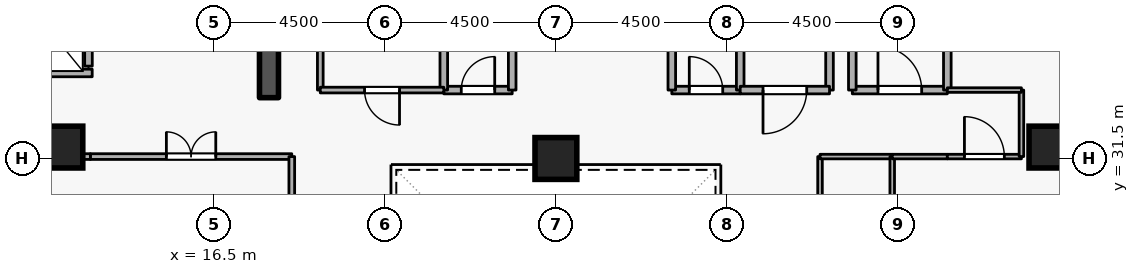
"""IFC4 building model, lengths in metres.
Left out: names, types, materials, properties, quantities, classifications, styles, units other than length and angle.
Written with IfcOpenShell. Run it as: python <this file> out.ifc"""

import sys

from ifc_helpers import new_model, si_unit, direction, frame, frame_2d, origin, origin_2d, place, context, subcontext, project, spatial, rectangle, extrude, element, fill, save


model = new_model("IFC4")
c1 = context("Model", 3, precision=1e-05, world=origin(), true_north=direction((0.0, 1.0)))
c2 = subcontext(c1, "Body", "Model", "MODEL_VIEW")
j1 = project(units=[si_unit("LENGTHUNIT", "METRE"), si_unit("PLANEANGLEUNIT", "RADIAN")], contexts=[c1])
p1 = place(None, origin())
s1 = spatial("IfcSite", under=j1, at=p1, CompositionType="ELEMENT")
p2 = place(p1, origin())
s2 = spatial("IfcBuilding", under=s1, at=p2, CompositionType="ELEMENT")
p3 = place(p2, frame((0.0, 0.0, 167.1)))
s3 = spatial("IfcBuildingStorey", under=s2, at=p3, CompositionType="ELEMENT", Elevation=167.1)
p4 = place(p3, frame((17.95, 33.1, 0.0), z_axis=(0.0, 0.0, 1.0), x_axis=(0.0, 1.0, 0.0)))
e1 = element("IfcWall", 1, at=p4, inside=s3, PredefinedType="SHEAR", context=c2, shape_type="SweptSolid", body=[
    extrude(rectangle(XDim=5.8, YDim=0.5, at=frame_2d((2.9, 0.0))), origin(), (0.0, 0.0, 1.0), 3.6),
])
for number, where, z_axis, x_axis in (
    (2, (12.5, 31.8, 0.0), (0.0, 0.0, 1.0), (1.0, 0.0, 0.0)),
    (3, (38.5, 31.8, 0.0), (0.0, 0.0, 1.0), (1.0, 0.0, 0.0)),
    (4, (25.5, 31.5, 0.0), (0.0, 0.0, 1.0), (1.0, 0.0, 0.0)),
):
    element("IfcColumn", number, at=place(p3, frame(where, z_axis=z_axis, x_axis=x_axis)), inside=s3, PredefinedType="COLUMN", context=c2, shape_type="SweptSolid", body=[
        extrude(rectangle(XDim=1.1, YDim=1.1, at=origin_2d()), origin(), (0.0, 0.0, 1.0), 3.6),
    ])
p5 = place(p3, frame((13.2, 33.93, 0.0), z_axis=(0.0, 0.0, 1.0), x_axis=(0.0, 1.0, 0.0)))
e5 = element("IfcWall", 5, at=p5, inside=s3, PredefinedType="STANDARD", context=c2, shape_type="SweptSolid", body=[
    extrude(rectangle(XDim=1.94, YDim=0.2, at=frame_2d((0.97, 0.0))), origin(), (0.0, 0.0, 1.0), 3.34),
])
p6 = place(p5, frame((0.46, 0.0, 0.0)))
e6 = element("IfcOpeningElement", 6, at=p6, cuts=e5, PredefinedType="OPENING", context=c2, shape_type="SweptSolid", body=[
    extrude(rectangle(XDim=1.02, YDim=2.06, at=frame_2d((0.51, 1.03))), frame((0.0, 0.11, 0.0), z_axis=(0.0, -1.0, 0.0), x_axis=(1.0, 0.0, 0.0)), (0.0, 0.0, 1.0), 0.22),
])
p7 = place(p3, frame((11.002, 33.75, 0.0), z_axis=(0.0, 0.0, 1.0), x_axis=(1.0, 0.0, 0.0)))
e7 = element("IfcWall", 7, at=p7, inside=s3, PredefinedType="STANDARD", context=c2, shape_type="SweptSolid", body=[
    extrude(rectangle(XDim=2.296, YDim=0.2, at=frame_2d((1.148, 0.0))), origin(), (0.0, 0.0, 1.0), 3.34),
])
p8 = place(p3, frame((33.3, 33.3, 0.0), z_axis=(0.0, 0.0, 1.0), x_axis=(1.0, 0.0, 0.0)))
e8 = element("IfcWall", 8, at=p8, inside=s3, PredefinedType="STANDARD", context=c2, shape_type="SweptSolid", body=[
    extrude(rectangle(XDim=2.5, YDim=0.2, at=frame_2d((1.25, 0.0))), origin(), (0.0, 0.0, 1.0), 3.34),
])
p9 = place(p8, frame((0.675, 0.0, 0.0)))
e9 = element("IfcOpeningElement", 9, at=p9, cuts=e8, PredefinedType="OPENING", context=c2, shape_type="SweptSolid", body=[
    extrude(rectangle(XDim=1.15, YDim=2.1, at=frame_2d((0.575, 1.05))), frame((0.0, 0.11, 0.0), z_axis=(0.0, -1.0, 0.0), x_axis=(1.0, 0.0, 0.0)), (0.0, 0.0, 1.0), 0.22),
])
p10 = place(p3, frame((35.8, 33.3, 0.0), z_axis=(0.0, 0.0, 1.0), x_axis=(0.0, 1.0, 0.0)))
e10 = element("IfcWall", 10, at=p10, inside=s3, PredefinedType="STANDARD", context=c2, shape_type="SweptSolid", body=[
    extrude(rectangle(XDim=5.7, YDim=0.2, at=frame_2d((2.85, 0.0))), origin(), (0.0, 0.0, 1.0), 3.34),
])
p11 = place(p3, frame((33.3, 35.6, 0.0), z_axis=(0.0, 0.0, 1.0), x_axis=(0.0, -1.0, 0.0)))
e11 = element("IfcWall", 11, at=p11, inside=s3, PredefinedType="STANDARD", context=c2, shape_type="SweptSolid", body=[
    extrude(rectangle(XDim=2.3, YDim=0.2, at=frame_2d((1.15, 0.0))), origin(), (0.0, 0.0, 1.0), 2.545),
])
p12 = place(p3, frame((22.55, 33.3, 0.0), z_axis=(0.0, 0.0, 1.0), x_axis=(1.0, 0.0, 0.0)))
e12 = element("IfcWall", 12, at=p12, inside=s3, PredefinedType="STANDARD", context=c2, shape_type="SweptSolid", body=[
    extrude(rectangle(XDim=1.8, YDim=0.2, at=frame_2d((0.9, 0.0))), origin(), (0.0, 0.0, 1.0), 3.34),
])
p13 = place(p12, frame((0.46, 0.0, 0.0)))
e13 = element("IfcOpeningElement", 13, at=p13, cuts=e12, PredefinedType="OPENING", context=c2, shape_type="SweptSolid", body=[
    extrude(rectangle(XDim=0.88, YDim=2.04, at=frame_2d((0.44, 1.02))), frame((0.0, 0.11, 0.0), z_axis=(0.0, -1.0, 0.0), x_axis=(1.0, 0.0, 0.0)), (0.0, 0.0, 1.0), 0.22),
])
for number, where, z_axis, x_axis in (
    (14, (24.35, 33.3, 0.0), (0.0, 0.0, 1.0), (0.0, 1.0, 0.0)),
    (15, (22.55, 35.35, 0.0), (0.0, 0.0, 1.0), (0.0, -1.0, 0.0)),
):
    element("IfcWall", number, at=place(p3, frame(where, z_axis=z_axis, x_axis=x_axis)), inside=s3, PredefinedType="STANDARD", context=c2, shape_type="SweptSolid", body=[
        extrude(rectangle(XDim=2.05, YDim=0.2, at=frame_2d((1.025, 0.0))), origin(), (0.0, 0.0, 1.0), 3.34),
    ])
p14 = place(p3, frame((28.55, 33.3, 0.0), z_axis=(0.0, 0.0, 1.0), x_axis=(1.0, 0.0, 0.0)))
e16 = element("IfcWall", 16, at=p14, inside=s3, PredefinedType="STANDARD", context=c2, shape_type="SweptSolid", body=[
    extrude(rectangle(XDim=1.8, YDim=0.2, at=frame_2d((0.9, 0.0))), origin(), (0.0, 0.0, 1.0), 3.34),
])
p15 = place(p14, frame((0.46, 0.0, 0.0)))
e17 = element("IfcOpeningElement", 17, at=p15, cuts=e16, PredefinedType="OPENING", context=c2, shape_type="SweptSolid", body=[
    extrude(rectangle(XDim=0.88, YDim=2.04, at=frame_2d((0.44, 1.02))), frame((0.0, 0.11, 0.0), z_axis=(0.0, -1.0, 0.0), x_axis=(1.0, 0.0, 0.0)), (0.0, 0.0, 1.0), 0.22),
])
for number, where, z_axis, x_axis in (
    (18, (30.35, 33.3, 0.0), (0.0, 0.0, 1.0), (0.0, 1.0, 0.0)),
    (19, (28.55, 35.35, 0.0), (0.0, 0.0, 1.0), (0.0, -1.0, 0.0)),
):
    element("IfcWall", number, at=place(p3, frame(where, z_axis=z_axis, x_axis=x_axis)), inside=s3, PredefinedType="STANDARD", context=c2, shape_type="SweptSolid", body=[
        extrude(rectangle(XDim=2.05, YDim=0.2, at=frame_2d((1.025, 0.0))), origin(), (0.0, 0.0, 1.0), 3.34),
    ])
p16 = place(p3, frame((32.7, 35.35, 0.0), z_axis=(0.0, 0.0, 1.0), x_axis=(0.0, -1.0, 0.0)))
e20 = element("IfcWall", 20, at=p16, inside=s3, PredefinedType="STANDARD", context=c2, shape_type="SweptSolid", body=[
    extrude(rectangle(XDim=2.05, YDim=0.2, at=frame_2d((1.025, 0.0))), origin(), (0.0, 0.0, 1.0), 2.545),
])
p17 = place(p3, frame((32.7, 33.3, 0.0), z_axis=(0.0, 0.0, 1.0), x_axis=(-1.0, 0.0, 0.0)))
e21 = element("IfcWall", 21, at=p17, inside=s3, PredefinedType="STANDARD", context=c2, shape_type="SweptSolid", body=[
    extrude(rectangle(XDim=2.35, YDim=0.2, at=frame_2d((1.175, 0.0))), origin(), (0.0, 0.0, 1.0), 3.34),
])
p18 = place(p17, frame((0.6, 0.0, 0.0)))
e22 = element("IfcOpeningElement", 22, at=p18, cuts=e21, PredefinedType="OPENING", context=c2, shape_type="SweptSolid", body=[
    extrude(rectangle(XDim=1.15, YDim=2.1, at=frame_2d((0.575, 1.05))), frame((0.0, 0.11, 0.0), z_axis=(0.0, -1.0, 0.0), x_axis=(1.0, 0.0, 0.0)), (0.0, 0.0, 1.0), 0.22),
])
p19 = place(p3, frame((19.3, 33.3, 0.0), z_axis=(0.0, 0.0, 1.0), x_axis=(0.0, 1.0, 0.0)))
e23 = element("IfcWall", 23, at=p19, inside=s3, PredefinedType="PARTITIONING", context=c2, shape_type="SweptSolid", body=[
    extrude(rectangle(XDim=2.05, YDim=0.15, at=frame_2d((1.025, 0.0))), origin(), (0.0, 0.0, 1.0), 3.34),
])
p20 = place(p3, frame((22.55, 33.3, 0.0), z_axis=(0.0, 0.0, 1.0), x_axis=(-1.0, 0.0, 0.0)))
e24 = element("IfcWall", 24, at=p20, inside=s3, PredefinedType="PARTITIONING", context=c2, shape_type="SweptSolid", body=[
    extrude(rectangle(XDim=3.25, YDim=0.15, at=frame_2d((1.625, 0.0))), origin(), (0.0, 0.0, 1.0), 3.34),
])
p21 = place(p20, frame((1.165, 0.0, 0.0)))
e25 = element("IfcOpeningElement", 25, at=p21, cuts=e24, PredefinedType="OPENING", context=c2, shape_type="SweptSolid", body=[
    extrude(rectangle(XDim=0.92, YDim=2.08, at=frame_2d((0.46, 1.04))), frame((0.0, 0.085, 0.0), z_axis=(0.0, -1.0, 0.0), x_axis=(1.0, 0.0, 0.0)), (0.0, 0.0, 1.0), 0.17),
])
p22 = place(p3, frame((13.25, 31.55, 0.0), z_axis=(0.0, 0.0, 1.0), x_axis=(1.0, 0.0, 0.0)))
e26 = element("IfcWall", 26, at=p22, inside=s3, PredefinedType="PARTITIONING", context=c2, shape_type="SweptSolid", body=[
    extrude(rectangle(XDim=5.3, YDim=0.15, at=frame_2d((2.65, 0.0))), origin(), (0.0, 0.0, 1.0), 3.34),
])
p23 = place(p22, frame((2.0, 0.0, 0.0)))
e27 = element("IfcOpeningElement", 27, at=p23, cuts=e26, PredefinedType="OPENING", context=c2, shape_type="SweptSolid", body=[
    extrude(rectangle(XDim=1.3, YDim=2.12, at=frame_2d((0.65, 1.06))), frame((0.0, 0.085, 0.0), z_axis=(0.0, -1.0, 0.0), x_axis=(1.0, 0.0, 0.0)), (0.0, 0.0, 1.0), 0.17),
])
p24 = place(p3, frame((18.55, 31.55, 0.0), z_axis=(0.0, 0.0, 1.0), x_axis=(0.0, -1.0, 0.0)))
e28 = element("IfcWall", 28, at=p24, inside=s3, PredefinedType="PARTITIONING", context=c2, shape_type="SweptSolid", body=[
    extrude(rectangle(XDim=2.25, YDim=0.15, at=frame_2d((1.125, 0.0))), origin(), (0.0, 0.0, 1.0), 3.34),
])
p25 = place(p3, frame((10.9, 31.55, 0.0), z_axis=(0.0, 0.0, 1.0), x_axis=(1.0, 0.0, 0.0)))
e29 = element("IfcWall", 29, at=p25, inside=s3, PredefinedType="PARTITIONING", context=c2, shape_type="SweptSolid", body=[
    extrude(rectangle(XDim=2.35, YDim=0.15, at=frame_2d((1.175, 0.0))), origin(), (0.0, 0.0, 1.0), 3.34),
])
p26 = place(p3, frame((32.45, 27.0, 0.0), z_axis=(0.0, 0.0, 1.0), x_axis=(0.0, 1.0, 0.0)))
e30 = element("IfcWall", 30, at=p26, inside=s3, PredefinedType="PARTITIONING", context=c2, shape_type="SweptSolid", body=[
    extrude(rectangle(XDim=4.55, YDim=0.12, at=frame_2d((2.275, 0.0))), origin(), (0.0, 0.0, 1.0), 3.34),
])
p27 = place(p26, frame((1.8, 0.0, 0.0)))
e31 = element("IfcOpeningElement", 31, at=p27, cuts=e30, PredefinedType="OPENING", context=c2, shape_type="SweptSolid", body=[
    extrude(rectangle(XDim=0.95, YDim=2.1, at=frame_2d((0.475, 1.05))), frame((0.0, 0.07, 0.0), z_axis=(0.0, -1.0, 0.0), x_axis=(1.0, 0.0, 0.0)), (0.0, 0.0, 1.0), 0.14),
])
p28 = place(p3, frame((32.45, 31.55, 0.0), z_axis=(0.0, 0.0, 1.0), x_axis=(1.0, 0.0, 0.0)))
e32 = element("IfcWall", 32, at=p28, inside=s3, PredefinedType="PARTITIONING", context=c2, shape_type="SweptSolid", body=[
    extrude(rectangle(XDim=1.9, YDim=0.12, at=frame_2d((0.95, 0.0))), origin(), (0.0, 0.0, 1.0), 3.34),
])
p29 = place(p3, frame((34.35, 31.55, 0.0), z_axis=(0.0, 0.0, 1.0), x_axis=(0.0, -1.0, 0.0)))
e33 = element("IfcWall", 33, at=p29, inside=s3, PredefinedType="PARTITIONING", context=c2, shape_type="SweptSolid", body=[
    extrude(rectangle(XDim=4.55, YDim=0.12, at=frame_2d((2.275, 0.0))), origin(), (0.0, 0.0, 1.0), 3.34),
])
p30 = place(p3, frame((34.35, 31.55, 0.0), z_axis=(0.0, 0.0, 1.0), x_axis=(1.0, 0.0, 0.0)))
e34 = element("IfcWall", 34, at=p30, inside=s3, PredefinedType="PARTITIONING", context=c2, shape_type="SweptSolid", body=[
    extrude(rectangle(XDim=1.45, YDim=0.12, at=frame_2d((0.725, 0.0))), origin(), (0.0, 0.0, 1.0), 3.34),
])
p31 = place(p3, frame((35.8, 31.55, 0.0), z_axis=(0.0, 0.0, 1.0), x_axis=(1.0, 0.0, 0.0)))
e35 = element("IfcWall", 35, at=p31, inside=s3, PredefinedType="PARTITIONING", context=c2, shape_type="SweptSolid", body=[
    extrude(rectangle(XDim=1.95, YDim=0.12, at=frame_2d((0.975, 0.0))), origin(), (0.0, 0.0, 1.0), 3.34),
])
p32 = place(p31, frame((0.45, 0.0, 0.0)))
e36 = element("IfcOpeningElement", 36, at=p32, cuts=e35, PredefinedType="OPENING", context=c2, shape_type="SweptSolid", body=[
    extrude(rectangle(XDim=1.05, YDim=2.1, at=frame_2d((0.525, 1.05))), frame((0.0, 0.07, 0.0), z_axis=(0.0, -1.0, 0.0), x_axis=(1.0, 0.0, 0.0)), (0.0, 0.0, 1.0), 0.14),
])
p33 = place(p3, frame((37.75, 31.55, 0.0), z_axis=(0.0, 0.0, 1.0), x_axis=(0.0, 1.0, 0.0)))
e37 = element("IfcWall", 37, at=p33, inside=s3, PredefinedType="PARTITIONING", context=c2, shape_type="SweptSolid", body=[
    extrude(rectangle(XDim=1.75, YDim=0.12, at=frame_2d((0.875, 0.0))), origin(), (0.0, 0.0, 1.0), 3.34),
])
p34 = place(p3, frame((37.75, 33.3, 0.0), z_axis=(0.0, 0.0, 1.0), x_axis=(-1.0, 0.0, 0.0)))
e38 = element("IfcWall", 38, at=p34, inside=s3, PredefinedType="PARTITIONING", context=c2, shape_type="SweptSolid", body=[
    extrude(rectangle(XDim=1.95, YDim=0.12, at=frame_2d((0.975, 0.0))), origin(), (0.0, 0.0, 1.0), 3.34),
])
p35 = place(p9, origin())
e39 = element("IfcDoor", 39, at=p35, inside=s3, OperationType="SINGLE_SWING_LEFT", PredefinedType="DOOR", context=c2, shape_type="SweptSolid", body=[
    extrude(rectangle(XDim=1.15, YDim=2.1, at=frame_2d((0.575, 1.05))), frame((0.0, 0.025, 0.0), z_axis=(0.0, -1.0, 0.0), x_axis=(1.0, 0.0, 0.0)), (0.0, 0.0, 1.0), 0.05),
])
fill(e9, e39)
p36 = place(p13, origin())
e40 = element("IfcDoor", 40, at=p36, inside=s3, OperationType="SINGLE_SWING_RIGHT", PredefinedType="DOOR", context=c2, shape_type="SweptSolid", body=[
    extrude(rectangle(XDim=0.88, YDim=2.04, at=frame_2d((0.44, 1.02))), frame((0.0, 0.025, 0.0), z_axis=(0.0, -1.0, 0.0), x_axis=(1.0, 0.0, 0.0)), (0.0, 0.0, 1.0), 0.05),
])
fill(e13, e40)
p37 = place(p15, origin())
e41 = element("IfcDoor", 41, at=p37, inside=s3, OperationType="SINGLE_SWING_LEFT", PredefinedType="DOOR", context=c2, shape_type="SweptSolid", body=[
    extrude(rectangle(XDim=0.88, YDim=2.04, at=frame_2d((0.44, 1.02))), frame((0.0, 0.025, 0.0), z_axis=(0.0, -1.0, 0.0), x_axis=(1.0, 0.0, 0.0)), (0.0, 0.0, 1.0), 0.05),
])
fill(e17, e41)
p38 = place(p21, origin())
e42 = element("IfcDoor", 42, at=p38, inside=s3, OperationType="SINGLE_SWING_LEFT", PredefinedType="DOOR", context=c2, shape_type="SweptSolid", body=[
    extrude(rectangle(XDim=0.92, YDim=2.08, at=frame_2d((0.46, 1.04))), frame((0.0, 0.025, 0.0), z_axis=(0.0, -1.0, 0.0), x_axis=(1.0, 0.0, 0.0)), (0.0, 0.0, 1.0), 0.05),
])
fill(e25, e42)
p39 = place(p18, origin())
e43 = element("IfcDoor", 43, at=p39, inside=s3, OperationType="SINGLE_SWING_RIGHT", PredefinedType="DOOR", context=c2, shape_type="SweptSolid", body=[
    extrude(rectangle(XDim=1.15, YDim=2.1, at=frame_2d((0.575, 1.05))), frame((0.0, 0.025, 0.0), z_axis=(0.0, -1.0, 0.0), x_axis=(1.0, 0.0, 0.0)), (0.0, 0.0, 1.0), 0.05),
])
fill(e22, e43)
p40 = place(p23, origin())
e44 = element("IfcDoor", 44, at=p40, inside=s3, OperationType="DOUBLE_DOOR_SINGLE_SWING", PredefinedType="DOOR", context=c2, shape_type="SweptSolid", body=[
    extrude(rectangle(XDim=1.3, YDim=2.12, at=frame_2d((0.65, 1.06))), frame((0.0, 0.025, 0.0), z_axis=(0.0, -1.0, 0.0), x_axis=(1.0, 0.0, 0.0)), (0.0, 0.0, 1.0), 0.05),
])
fill(e27, e44)
p41 = place(p32, origin())
e45 = element("IfcDoor", 45, at=p41, inside=s3, OperationType="SINGLE_SWING_LEFT", PredefinedType="DOOR", context=c2, shape_type="SweptSolid", body=[
    extrude(rectangle(XDim=1.05, YDim=2.1, at=frame_2d((0.525, 1.05))), frame((0.0, 0.025, 0.0), z_axis=(0.0, -1.0, 0.0), x_axis=(1.0, 0.0, 0.0)), (0.0, 0.0, 1.0), 0.05),
])
fill(e36, e45)
save(model, sys.argv[1])
